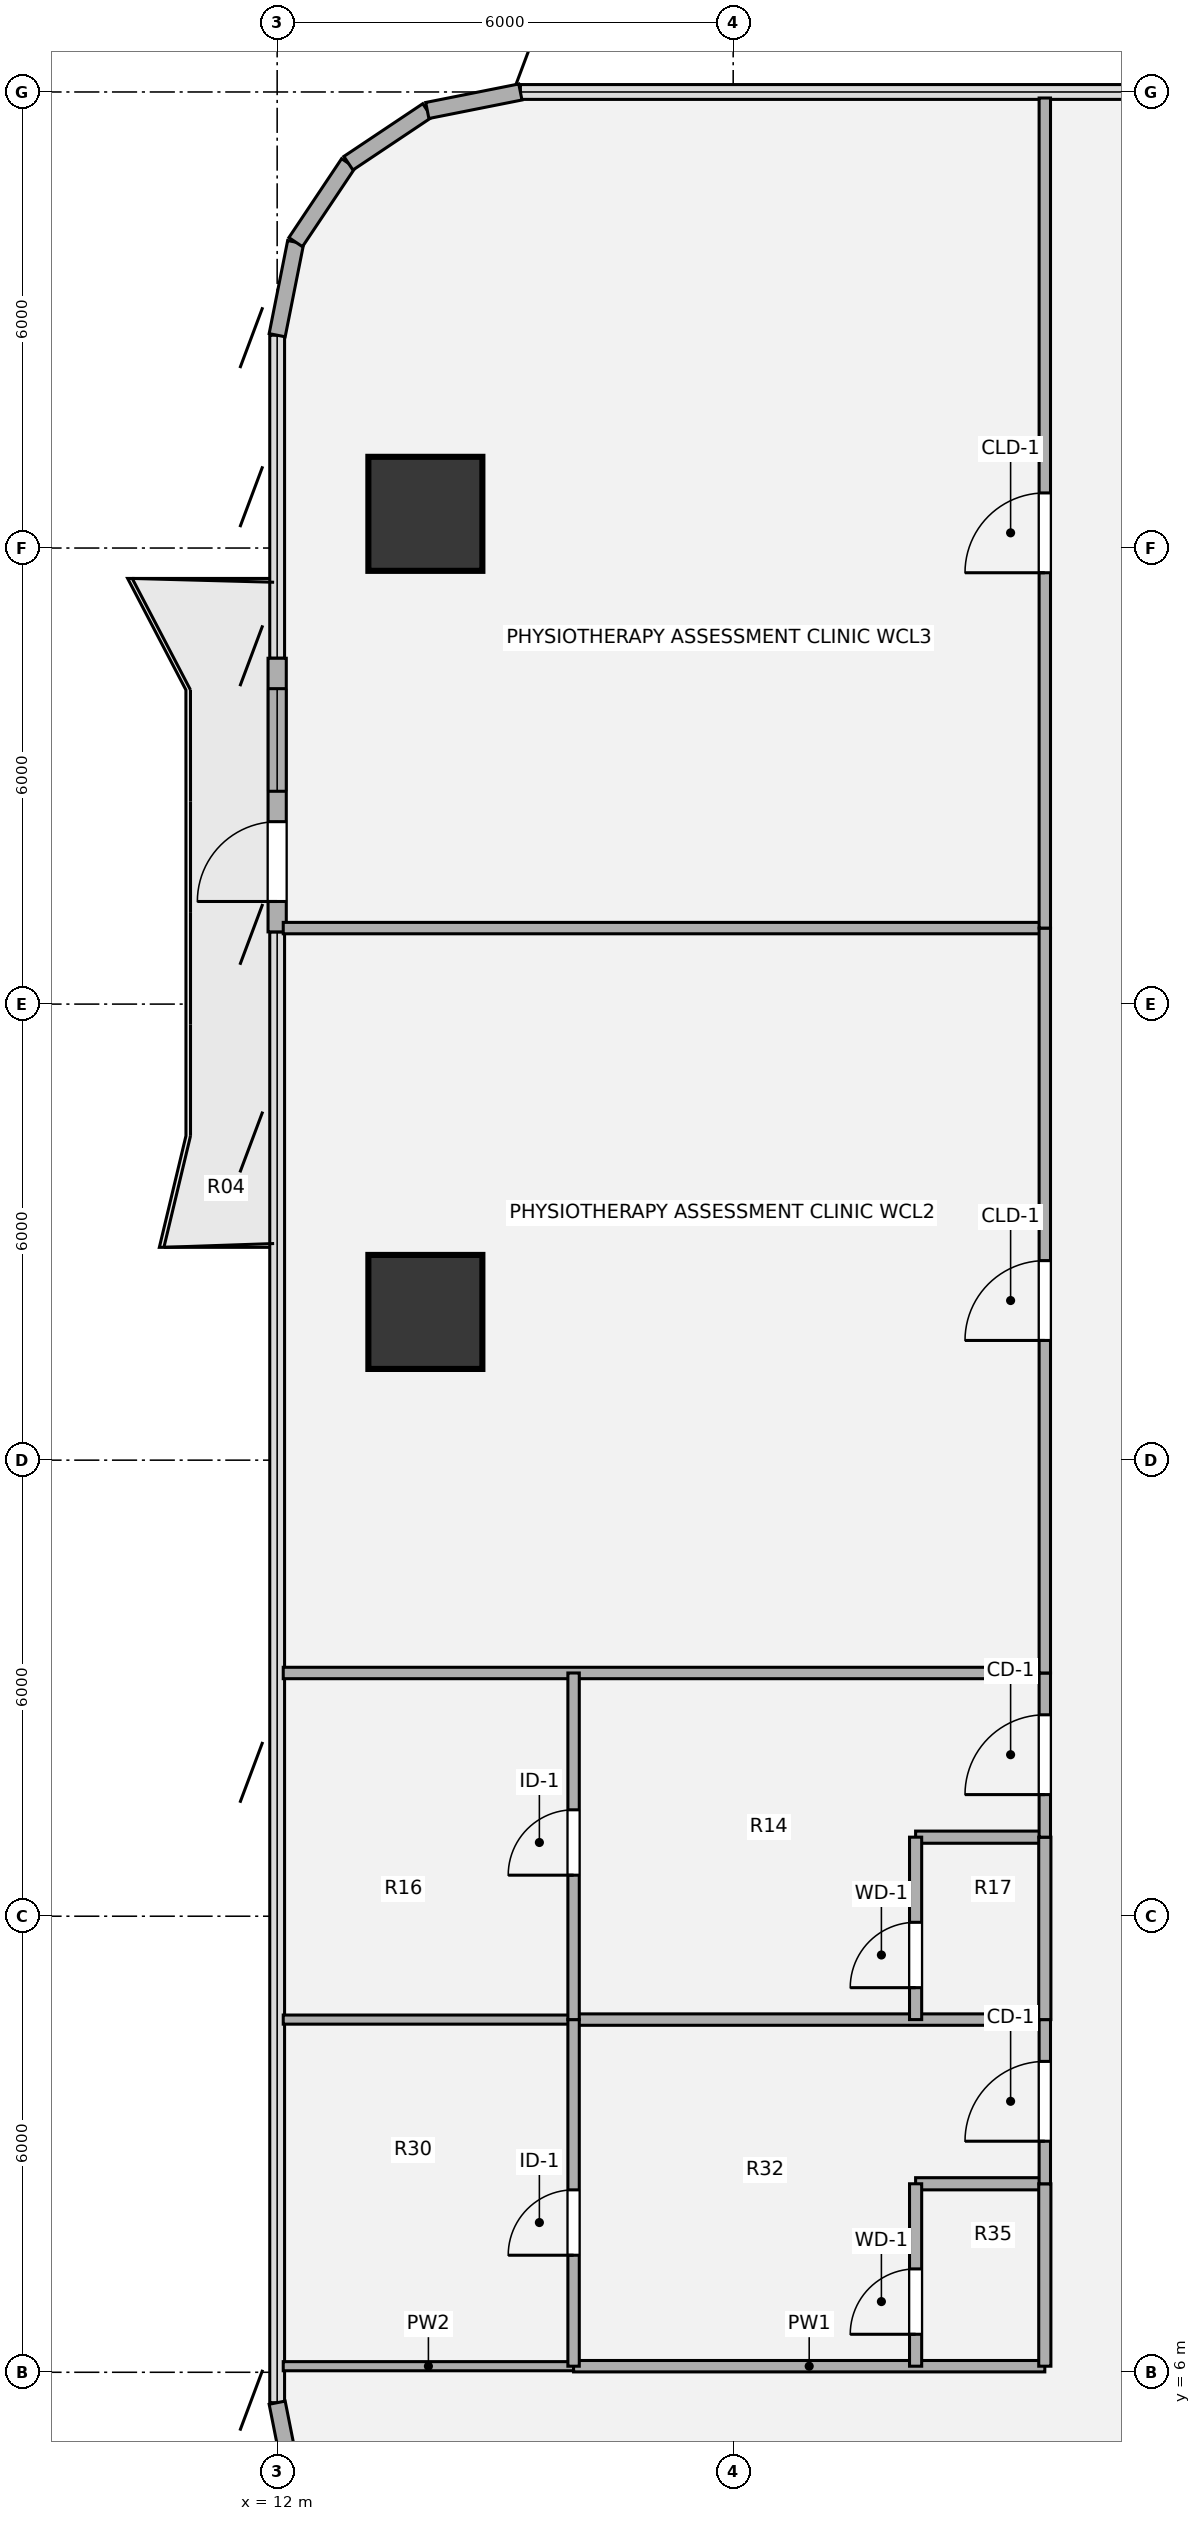
"""IFC4 building model, lengths in metres.
Left out: names, types, materials, properties, quantities, classifications, styles, units other than length and angle.
Written with IfcOpenShell. Run it as: python <this file> out.ifc"""

import sys

from ifc_helpers import new_model, si_unit, direction, frame, frame_2d, origin, origin_2d, place, context, subcontext, project, spatial, rectangle, hollow_circle, extrude, source, transform, mapped, element, fill, save


model = new_model("IFC4")
c1 = context("Model", 3, precision=1e-05, world=origin(), true_north=direction((0.0, 1.0)))
c2 = subcontext(c1, "Body", "Model", "MODEL_VIEW")
j1 = project(units=[si_unit("LENGTHUNIT", "METRE"), si_unit("PLANEANGLEUNIT", "RADIAN")], contexts=[c1])
p1 = place(None, origin())
s1 = spatial("IfcSite", under=j1, at=p1, CompositionType="ELEMENT")
p2 = place(p1, origin())
s2 = spatial("IfcBuilding", under=s1, at=p2, CompositionType="ELEMENT")
p3 = place(p2, frame((0.0, 0.0, 53.46)))
s3 = spatial("IfcBuildingStorey", under=s2, at=p3, CompositionType="ELEMENT", Elevation=53.46)
m1 = source(origin(), c2, "Body", "SweptSolid", [
    extrude(hollow_circle(Radius=0.75, WallThickness=0.05, at=origin_2d()), origin(), (0.0, 0.0, 1.0), 3.78),
])
for number, where, z_axis, x_axis in (
    (1, (13.95, 19.95, 0.0), (0.0, 0.0, 1.0), (1.0, 0.0, 0.0)),
    (2, (13.95, 30.45, 0.0), (0.0, 0.0, 1.0), (1.0, 0.0, 0.0)),
):
    element("IfcColumn", number, at=place(p3, frame(where, z_axis=z_axis, x_axis=x_axis)), inside=s3, PredefinedType="COLUMN", context=c2, shape_type="MappedRepresentation", body=[
        mapped(m1, transform((0.0, 0.0, 0.0), x_axis=(1.0, 0.0, 0.0), y_axis=(0.0, 1.0, 0.0), z_axis=(0.0, 0.0, 1.0), scale=1.0)),
    ])
p4 = place(p3, frame((12.244, 4.375, 0.0), z_axis=(0.0, 0.0, 1.0), x_axis=(-0.195138390419, 0.980775717779, 0.0)))
e3 = element("IfcWall", 3, at=p4, inside=s3, PredefinedType="SOLIDWALL", context=c2, shape_type="SweptSolid", body=[
    extrude(rectangle(XDim=1.249, YDim=0.215, at=frame_2d((0.624, 0.0))), origin(), (0.0, 0.0, 1.0), 3.53),
])
p5 = place(p3, frame((12.0, 24.95, 0.0), z_axis=(0.0, 0.0, 1.0), x_axis=(0.0, 1.0, 0.0)))
e4 = element("IfcWall", 4, at=p5, inside=s3, PredefinedType="SOLIDWALL", context=c2, shape_type="SweptSolid", body=[
    extrude(rectangle(XDim=3.6, YDim=0.24, at=frame_2d((1.8, 0.0))), origin(), (0.0, 0.0, 1.0), 3.53),
])
p6 = place(p5, frame((0.4, 0.0, 0.0)))
e5 = element("IfcOpeningElement", 5, at=p6, cuts=e4, PredefinedType="OPENING", context=c2, shape_type="SweptSolid", body=[
    extrude(rectangle(XDim=1.05, YDim=2.15, at=origin_2d()), frame((0.525, 0.13, 1.075), z_axis=(0.0, -1.0, 0.0), x_axis=(1.0, 0.0, 0.0)), (0.0, 0.0, 1.0), 0.26),
])
p7 = place(p5, frame((1.85, 0.0, 0.85)))
e6 = element("IfcOpeningElement", 6, at=p7, cuts=e4, PredefinedType="OPENING", context=c2, shape_type="SweptSolid", body=[
    extrude(rectangle(XDim=1.35, YDim=1.35, at=origin_2d()), frame((0.675, 0.13, 0.675), z_axis=(0.0, -1.0, 0.0), x_axis=(1.0, 0.0, 0.0)), (0.0, 0.0, 1.0), 0.26),
])
for number, where, z_axis, x_axis in (
    (7, (12.0, 32.8, 0.0), (0.0, 0.0, 1.0), (0.195, 0.981, 0.0)),
    (8, (12.244, 34.025, 0.0), (0.0, 0.0, 1.0), (0.556, 0.831, 0.0)),
    (9, (12.937, 35.063, 0.0), (0.0, 0.0, 1.0), (0.831, 0.556, 0.0)),
    (10, (13.975, 35.756, 0.0), (0.0, 0.0, 1.0), (0.981, 0.195, 0.0)),
):
    element("IfcWall", number, at=place(p3, frame(where, z_axis=z_axis, x_axis=x_axis)), inside=s3, PredefinedType="SOLIDWALL", context=c2, shape_type="SweptSolid", body=[
        extrude(rectangle(XDim=1.249, YDim=0.215, at=frame_2d((0.624, 0.0))), origin(), (0.0, 0.0, 1.0), 3.53),
    ])
p8 = place(p3, frame((12.08, 6.08, 0.0), z_axis=(0.0, 0.0, 1.0), x_axis=(1.0, 0.0, 0.0)))
e11 = element("IfcWall", 11, at=p8, inside=s3, PredefinedType="PARTITIONING", context=c2, shape_type="SweptSolid", body=[
    extrude(rectangle(XDim=3.82, YDim=0.12, at=frame_2d((1.91, 0.0))), origin(), (0.0, 0.0, 1.0), 3.5),
])
p9 = place(p3, frame((15.9, 6.08, 0.0), z_axis=(0.0, 0.0, 1.0), x_axis=(1.0, 0.0, 0.0)))
e12 = element("IfcWall", 12, at=p9, inside=s3, PredefinedType="PARTITIONING", context=c2, shape_type="SweptSolid", body=[
    extrude(rectangle(XDim=6.2, YDim=0.15, at=frame_2d((3.1, 0.0))), origin(), (0.0, 0.0, 1.0), 3.5),
])
p10 = place(p3, frame((20.4, 8.48, 0.0), z_axis=(0.0, 0.0, 1.0), x_axis=(1.0, 0.0, 0.0)))
e13 = element("IfcWall", 13, at=p10, inside=s3, PredefinedType="PLUMBINGWALL", context=c2, shape_type="SweptSolid", body=[
    extrude(rectangle(XDim=1.7, YDim=0.16, at=frame_2d((0.85, 0.0))), origin(), (0.0, 0.0, 1.0), 3.5),
])
p11 = place(p3, frame((12.08, 10.64, 0.0), z_axis=(0.0, 0.0, 1.0), x_axis=(1.0, 0.0, 0.0)))
e14 = element("IfcWall", 14, at=p11, inside=s3, PredefinedType="PARTITIONING", context=c2, shape_type="SweptSolid", body=[
    extrude(rectangle(XDim=3.82, YDim=0.12, at=frame_2d((1.91, 0.0))), origin(), (0.0, 0.0, 1.0), 3.5),
])
p12 = place(p3, frame((15.9, 10.64, 0.0), z_axis=(0.0, 0.0, 1.0), x_axis=(1.0, 0.0, 0.0)))
e15 = element("IfcWall", 15, at=p12, inside=s3, PredefinedType="PARTITIONING", context=c2, shape_type="SweptSolid", body=[
    extrude(rectangle(XDim=6.2, YDim=0.15, at=frame_2d((3.1, 0.0))), origin(), (0.0, 0.0, 1.0), 3.5),
])
p13 = place(p3, frame((20.4, 13.04, 0.0), z_axis=(0.0, 0.0, 1.0), x_axis=(1.0, 0.0, 0.0)))
e16 = element("IfcWall", 16, at=p13, inside=s3, PredefinedType="PLUMBINGWALL", context=c2, shape_type="SweptSolid", body=[
    extrude(rectangle(XDim=1.7, YDim=0.16, at=frame_2d((0.85, 0.0))), origin(), (0.0, 0.0, 1.0), 3.5),
])
p14 = place(p3, frame((12.08, 15.2, 0.0), z_axis=(0.0, 0.0, 1.0), x_axis=(1.0, 0.0, 0.0)))
e17 = element("IfcWall", 17, at=p14, inside=s3, PredefinedType="PARTITIONING", context=c2, shape_type="SweptSolid", body=[
    extrude(rectangle(XDim=10.02, YDim=0.15, at=frame_2d((5.01, 0.0))), origin(), (0.0, 0.0, 1.0), 3.5),
])
p15 = place(p3, frame((12.08, 25.0, 0.0), z_axis=(0.0, 0.0, 1.0), x_axis=(1.0, 0.0, 0.0)))
e18 = element("IfcWall", 18, at=p15, inside=s3, PredefinedType="PARTITIONING", context=c2, shape_type="SweptSolid", body=[
    extrude(rectangle(XDim=10.02, YDim=0.15, at=frame_2d((5.01, 0.0))), origin(), (0.0, 0.0, 1.0), 2.982),
])
p16 = place(p3, frame((15.9, 6.08, 0.0), z_axis=(0.0, 0.0, 1.0), x_axis=(0.0, 1.0, 0.0)))
e19 = element("IfcWall", 19, at=p16, inside=s3, PredefinedType="PARTITIONING", context=c2, shape_type="SweptSolid", body=[
    extrude(rectangle(XDim=4.56, YDim=0.15, at=frame_2d((2.28, 0.0))), origin(), (0.0, 0.0, 1.0), 3.5),
])
p17 = place(p16, frame((1.46, 0.0, 0.0)))
e20 = element("IfcOpeningElement", 20, at=p17, cuts=e19, PredefinedType="OPENING", context=c2, shape_type="SweptSolid", body=[
    extrude(rectangle(XDim=0.86, YDim=2.1, at=origin_2d()), frame((0.43, 0.085, 1.05), z_axis=(0.0, -1.0, 0.0), x_axis=(1.0, 0.0, 0.0)), (0.0, 0.0, 1.0), 0.17),
])
p18 = place(p3, frame((15.9, 10.64, 0.0), z_axis=(0.0, 0.0, 1.0), x_axis=(0.0, 1.0, 0.0)))
e21 = element("IfcWall", 21, at=p18, inside=s3, PredefinedType="PARTITIONING", context=c2, shape_type="SweptSolid", body=[
    extrude(rectangle(XDim=4.56, YDim=0.15, at=frame_2d((2.28, 0.0))), origin(), (0.0, 0.0, 1.0), 3.5),
])
p19 = place(p18, frame((1.9, 0.0, 0.0)))
e22 = element("IfcOpeningElement", 22, at=p19, cuts=e21, PredefinedType="OPENING", context=c2, shape_type="SweptSolid", body=[
    extrude(rectangle(XDim=0.86, YDim=2.1, at=origin_2d()), frame((0.43, 0.085, 1.05), z_axis=(0.0, -1.0, 0.0), x_axis=(1.0, 0.0, 0.0)), (0.0, 0.0, 1.0), 0.17),
])
p20 = place(p3, frame((20.4, 6.08, 0.0), z_axis=(0.0, 0.0, 1.0), x_axis=(0.0, 1.0, 0.0)))
e23 = element("IfcWall", 23, at=p20, inside=s3, PredefinedType="PLUMBINGWALL", context=c2, shape_type="SweptSolid", body=[
    extrude(rectangle(XDim=2.4, YDim=0.16, at=frame_2d((1.2, 0.0))), origin(), (0.0, 0.0, 1.0), 3.5),
])
p21 = place(p20, frame((0.42, 0.0, 0.0)))
e24 = element("IfcOpeningElement", 24, at=p21, cuts=e23, PredefinedType="OPENING", context=c2, shape_type="SweptSolid", body=[
    extrude(rectangle(XDim=0.86, YDim=2.1, at=origin_2d()), frame((0.43, 0.09, 1.05), z_axis=(0.0, -1.0, 0.0), x_axis=(1.0, 0.0, 0.0)), (0.0, 0.0, 1.0), 0.18),
])
p22 = place(p3, frame((20.4, 10.64, 0.0), z_axis=(0.0, 0.0, 1.0), x_axis=(0.0, 1.0, 0.0)))
e25 = element("IfcWall", 25, at=p22, inside=s3, PredefinedType="PLUMBINGWALL", context=c2, shape_type="SweptSolid", body=[
    extrude(rectangle(XDim=2.4, YDim=0.16, at=frame_2d((1.2, 0.0))), origin(), (0.0, 0.0, 1.0), 3.5),
])
p23 = place(p22, frame((0.42, 0.0, 0.0)))
e26 = element("IfcOpeningElement", 26, at=p23, cuts=e25, PredefinedType="OPENING", context=c2, shape_type="SweptSolid", body=[
    extrude(rectangle(XDim=0.86, YDim=2.1, at=origin_2d()), frame((0.43, 0.09, 1.05), z_axis=(0.0, -1.0, 0.0), x_axis=(1.0, 0.0, 0.0)), (0.0, 0.0, 1.0), 0.18),
])
p24 = place(p3, frame((22.1, 6.08, 0.0), z_axis=(0.0, 0.0, 1.0), x_axis=(0.0, 1.0, 0.0)))
e27 = element("IfcWall", 27, at=p24, inside=s3, PredefinedType="PLUMBINGWALL", context=c2, shape_type="SweptSolid", body=[
    extrude(rectangle(XDim=2.4, YDim=0.16, at=frame_2d((1.2, 0.0))), origin(), (0.0, 0.0, 1.0), 3.5),
])
p25 = place(p3, frame((22.1, 8.48, 0.0), z_axis=(0.0, 0.0, 1.0), x_axis=(0.0, 1.0, 0.0)))
e28 = element("IfcWall", 28, at=p25, inside=s3, PredefinedType="PARTITIONING", context=c2, shape_type="SweptSolid", body=[
    extrude(rectangle(XDim=2.16, YDim=0.15, at=frame_2d((1.08, 0.0))), origin(), (0.0, 0.0, 1.0), 3.5),
])
p26 = place(p25, frame((0.56, 0.0, 0.0)))
e29 = element("IfcOpeningElement", 29, at=p26, cuts=e28, PredefinedType="OPENING", context=c2, shape_type="SweptSolid", body=[
    extrude(rectangle(XDim=1.05, YDim=2.1, at=origin_2d()), frame((0.525, 0.085, 1.05), z_axis=(0.0, -1.0, 0.0), x_axis=(1.0, 0.0, 0.0)), (0.0, 0.0, 1.0), 0.17),
])
p27 = place(p3, frame((22.1, 10.64, 0.0), z_axis=(0.0, 0.0, 1.0), x_axis=(0.0, 1.0, 0.0)))
e30 = element("IfcWall", 30, at=p27, inside=s3, PredefinedType="PLUMBINGWALL", context=c2, shape_type="SweptSolid", body=[
    extrude(rectangle(XDim=2.4, YDim=0.16, at=frame_2d((1.2, 0.0))), origin(), (0.0, 0.0, 1.0), 3.5),
])
p28 = place(p3, frame((22.1, 13.04, 0.0), z_axis=(0.0, 0.0, 1.0), x_axis=(0.0, 1.0, 0.0)))
e31 = element("IfcWall", 31, at=p28, inside=s3, PredefinedType="PARTITIONING", context=c2, shape_type="SweptSolid", body=[
    extrude(rectangle(XDim=2.16, YDim=0.15, at=frame_2d((1.08, 0.0))), origin(), (0.0, 0.0, 1.0), 3.5),
])
p29 = place(p28, frame((0.56, 0.0, 0.0)))
e32 = element("IfcOpeningElement", 32, at=p29, cuts=e31, PredefinedType="OPENING", context=c2, shape_type="SweptSolid", body=[
    extrude(rectangle(XDim=1.05, YDim=2.1, at=origin_2d()), frame((0.525, 0.085, 1.05), z_axis=(0.0, -1.0, 0.0), x_axis=(1.0, 0.0, 0.0)), (0.0, 0.0, 1.0), 0.17),
])
p30 = place(p3, frame((22.1, 15.2, 0.0), z_axis=(0.0, 0.0, 1.0), x_axis=(0.0, 1.0, 0.0)))
e33 = element("IfcWall", 33, at=p30, inside=s3, PredefinedType="PARTITIONING", context=c2, shape_type="SweptSolid", body=[
    extrude(rectangle(XDim=9.8, YDim=0.15, at=frame_2d((4.9, 0.0))), origin(), (0.0, 0.0, 1.0), 3.5),
])
p31 = place(p30, frame((4.375, 0.0, 0.0)))
e34 = element("IfcOpeningElement", 34, at=p31, cuts=e33, PredefinedType="OPENING", context=c2, shape_type="SweptSolid", body=[
    extrude(rectangle(XDim=1.05, YDim=2.1, at=origin_2d()), frame((0.525, 0.085, 1.05), z_axis=(0.0, -1.0, 0.0), x_axis=(1.0, 0.0, 0.0)), (0.0, 0.0, 1.0), 0.17),
])
p32 = place(p3, frame((22.1, 25.0, 0.0), z_axis=(0.0, 0.0, 1.0), x_axis=(0.0, 1.0, 0.0)))
e35 = element("IfcWall", 35, at=p32, inside=s3, PredefinedType="PARTITIONING", context=c2, shape_type="SweptSolid", body=[
    extrude(rectangle(XDim=10.921, YDim=0.15, at=frame_2d((5.46, 0.0))), origin(), (0.0, 0.0, 1.0), 3.5),
])
p33 = place(p32, frame((4.675, 0.0, 0.0)))
e36 = element("IfcOpeningElement", 36, at=p33, cuts=e35, PredefinedType="OPENING", context=c2, shape_type="SweptSolid", body=[
    extrude(rectangle(XDim=1.05, YDim=2.1, at=origin_2d()), frame((0.525, 0.085, 1.05), z_axis=(0.0, -1.0, 0.0), x_axis=(1.0, 0.0, 0.0)), (0.0, 0.0, 1.0), 0.17),
])
m2 = source(origin(), c2, "Body", "SweptSolid", [
    extrude(rectangle(XDim=1.05, YDim=2.15, at=origin_2d()), frame((0.525, 0.025, 1.075), z_axis=(0.0, -1.0, 0.0), x_axis=(1.0, 0.0, 0.0)), (0.0, 0.0, 1.0), 0.05),
])
p34 = place(p6, origin())
e37 = element("IfcDoor", 37, at=p34, inside=s3, OperationType="SINGLE_SWING_LEFT", PredefinedType="DOOR", context=c2, shape_type="MappedRepresentation", body=[
    mapped(m2, transform((0.0, 0.0, 0.0), x_axis=(1.0, 0.0, 0.0), y_axis=(0.0, 1.0, 0.0), z_axis=(0.0, 0.0, 1.0), scale=1.0)),
])
fill(e5, e37)
m3 = source(origin(), c2, "Body", "SweptSolid", [
    extrude(rectangle(XDim=1.35, YDim=1.35, at=origin_2d()), frame((0.675, 0.03, 0.675), z_axis=(0.0, -1.0, 0.0), x_axis=(1.0, 0.0, 0.0)), (0.0, 0.0, 1.0), 0.06),
])
p35 = place(p7, origin())
e38 = element("IfcWindow", 38, at=p35, inside=s3, PartitioningType="SINGLE_PANEL", PredefinedType="WINDOW", context=c2, shape_type="MappedRepresentation", body=[
    mapped(m3, transform((0.0, 0.0, 0.0), x_axis=(1.0, 0.0, 0.0), y_axis=(0.0, 1.0, 0.0), z_axis=(0.0, 0.0, 1.0), scale=1.0)),
])
fill(e6, e38)
m4 = source(origin(), c2, "Body", "SweptSolid", [
    extrude(rectangle(XDim=0.86, YDim=2.1, at=origin_2d()), frame((0.43, 0.025, 1.05), z_axis=(0.0, -1.0, 0.0), x_axis=(1.0, 0.0, 0.0)), (0.0, 0.0, 1.0), 0.05),
])
p36 = place(p17, origin())
e39 = element("IfcDoor", 39, at=p36, inside=s3, OperationType="SINGLE_SWING_LEFT", PredefinedType="DOOR", context=c2, shape_type="MappedRepresentation", body=[
    mapped(m4, transform((0.0, 0.0, 0.0), x_axis=(1.0, 0.0, 0.0), y_axis=(0.0, 1.0, 0.0), z_axis=(0.0, 0.0, 1.0), scale=1.0)),
])
fill(e20, e39)
p37 = place(p19, origin())
e40 = element("IfcDoor", 40, at=p37, inside=s3, OperationType="SINGLE_SWING_LEFT", PredefinedType="DOOR", context=c2, shape_type="MappedRepresentation", body=[
    mapped(m4, transform((0.0, 0.0, 0.0), x_axis=(1.0, 0.0, 0.0), y_axis=(0.0, 1.0, 0.0), z_axis=(0.0, 0.0, 1.0), scale=1.0)),
])
fill(e22, e40)
m5 = source(origin(), c2, "Body", "SweptSolid", [
    extrude(rectangle(XDim=0.86, YDim=2.1, at=origin_2d()), frame((0.43, 0.025, 1.05), z_axis=(0.0, -1.0, 0.0), x_axis=(1.0, 0.0, 0.0)), (0.0, 0.0, 1.0), 0.05),
])
p38 = place(p21, origin())
e41 = element("IfcDoor", 41, at=p38, inside=s3, OperationType="SINGLE_SWING_LEFT", PredefinedType="DOOR", context=c2, shape_type="MappedRepresentation", body=[
    mapped(m5, transform((0.0, 0.0, 0.0), x_axis=(1.0, 0.0, 0.0), y_axis=(0.0, 1.0, 0.0), z_axis=(0.0, 0.0, 1.0), scale=1.0)),
])
fill(e24, e41)
p39 = place(p23, origin())
e42 = element("IfcDoor", 42, at=p39, inside=s3, OperationType="SINGLE_SWING_LEFT", PredefinedType="DOOR", context=c2, shape_type="MappedRepresentation", body=[
    mapped(m5, transform((0.0, 0.0, 0.0), x_axis=(1.0, 0.0, 0.0), y_axis=(0.0, 1.0, 0.0), z_axis=(0.0, 0.0, 1.0), scale=1.0)),
])
fill(e26, e42)
m6 = source(origin(), c2, "Body", "SweptSolid", [
    extrude(rectangle(XDim=1.05, YDim=2.1, at=origin_2d()), frame((0.525, 0.025, 1.05), z_axis=(0.0, -1.0, 0.0), x_axis=(1.0, 0.0, 0.0)), (0.0, 0.0, 1.0), 0.05),
])
p40 = place(p26, origin())
e43 = element("IfcDoor", 43, at=p40, inside=s3, OperationType="SINGLE_SWING_LEFT", PredefinedType="DOOR", context=c2, shape_type="MappedRepresentation", body=[
    mapped(m6, transform((0.0, 0.0, 0.0), x_axis=(1.0, 0.0, 0.0), y_axis=(0.0, 1.0, 0.0), z_axis=(0.0, 0.0, 1.0), scale=1.0)),
])
fill(e29, e43)
p41 = place(p29, origin())
e44 = element("IfcDoor", 44, at=p41, inside=s3, OperationType="SINGLE_SWING_LEFT", PredefinedType="DOOR", context=c2, shape_type="MappedRepresentation", body=[
    mapped(m6, transform((0.0, 0.0, 0.0), x_axis=(1.0, 0.0, 0.0), y_axis=(0.0, 1.0, 0.0), z_axis=(0.0, 0.0, 1.0), scale=1.0)),
])
fill(e32, e44)
m7 = source(origin(), c2, "Body", "SweptSolid", [
    extrude(rectangle(XDim=1.05, YDim=2.1, at=origin_2d()), frame((0.525, 0.025, 1.05), z_axis=(0.0, -1.0, 0.0), x_axis=(1.0, 0.0, 0.0)), (0.0, 0.0, 1.0), 0.05),
])
p42 = place(p31, origin())
e45 = element("IfcDoor", 45, at=p42, inside=s3, OperationType="SINGLE_SWING_LEFT", PredefinedType="DOOR", context=c2, shape_type="MappedRepresentation", body=[
    mapped(m7, transform((0.0, 0.0, 0.0), x_axis=(1.0, 0.0, 0.0), y_axis=(0.0, 1.0, 0.0), z_axis=(0.0, 0.0, 1.0), scale=1.0)),
])
fill(e34, e45)
p43 = place(p33, origin())
e46 = element("IfcDoor", 46, at=p43, inside=s3, OperationType="SINGLE_SWING_LEFT", PredefinedType="DOOR", context=c2, shape_type="MappedRepresentation", body=[
    mapped(m7, transform((0.0, 0.0, 0.0), x_axis=(1.0, 0.0, 0.0), y_axis=(0.0, 1.0, 0.0), z_axis=(0.0, 0.0, 1.0), scale=1.0)),
])
fill(e36, e46)
save(model, sys.argv[1])
